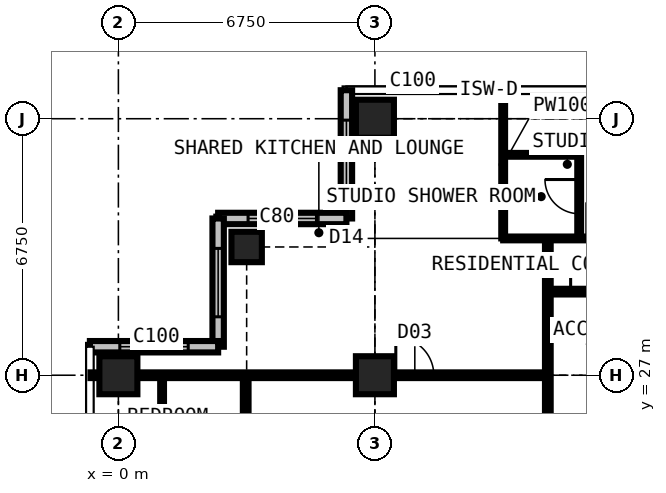
"""IFC4 building model, lengths in metres.
Left out: names, types, materials, properties, quantities, classifications, styles, units other than length and angle.
Written with IfcOpenShell. Run it as: python <this file> out.ifc"""

import sys

from ifc_helpers import new_model, si_unit, direction, frame, frame_2d, origin, origin_2d, place, context, subcontext, project, spatial, rectangle, extrude, element, fill, save


model = new_model("IFC4")
c1 = context("Model", 3, precision=1e-05, world=origin(), true_north=direction((0.0, 1.0)))
c2 = subcontext(c1, "Body", "Model", "MODEL_VIEW")
j1 = project(units=[si_unit("LENGTHUNIT", "METRE"), si_unit("PLANEANGLEUNIT", "RADIAN")], contexts=[c1])
p1 = place(None, origin())
s1 = spatial("IfcSite", under=j1, at=p1, CompositionType="ELEMENT")
p2 = place(p1, origin())
s2 = spatial("IfcBuilding", under=s1, at=p2, CompositionType="ELEMENT")
p3 = place(p2, frame((0.0, 0.0, 240.3)))
s3 = spatial("IfcBuildingStorey", under=s2, at=p3, CompositionType="ELEMENT", Elevation=240.3)
p4 = place(p3, frame((0.0, 27.0, 0.0), z_axis=(0.0, 0.0, 1.0), x_axis=(1.0, 0.0, 0.0)))
e1 = element("IfcColumn", 1, at=p4, inside=s3, PredefinedType="COLUMN", context=c2, shape_type="SweptSolid", body=[
    extrude(rectangle(XDim=1.0, YDim=1.0, at=origin_2d()), origin(), (0.0, 0.0, 1.0), 3.6),
])
p5 = place(p3, frame((3.375, 30.375, 0.0), z_axis=(0.0, 0.0, 1.0), x_axis=(1.0, 0.0, 0.0)))
e2 = element("IfcColumn", 2, at=p5, inside=s3, PredefinedType="COLUMN", context=c2, shape_type="SweptSolid", body=[
    extrude(rectangle(XDim=0.8, YDim=0.8, at=origin_2d()), origin(), (0.0, 0.0, 1.0), 3.6),
])
for number, where, z_axis, x_axis in (
    (3, (6.75, 27.0, 0.0), (0.0, 0.0, 1.0), (1.0, 0.0, 0.0)),
    (4, (6.75, 33.75, 0.0), (0.0, 0.0, 1.0), (1.0, 0.0, 0.0)),
):
    element("IfcColumn", number, at=place(p3, frame(where, z_axis=z_axis, x_axis=x_axis)), inside=s3, PredefinedType="COLUMN", context=c2, shape_type="SweptSolid", body=[
        extrude(rectangle(XDim=1.0, YDim=1.0, at=origin_2d()), origin(), (0.0, 0.0, 1.0), 3.6),
    ])
p6 = place(p3, frame((6.0, 34.5, 0.0), z_axis=(0.0, 0.0, 1.0), x_axis=(0.0, -1.0, 0.0)))
e5 = element("IfcWall", 5, at=p6, inside=s3, PredefinedType="SOLIDWALL", context=c2, shape_type="SweptSolid", body=[
    extrude(rectangle(XDim=3.375, YDim=0.3, at=frame_2d((1.688, 0.0))), origin(), (0.0, 0.0, 1.0), 3.375),
])
p7 = place(p6, frame((0.788, 0.0, 0.6)))
e6 = element("IfcOpeningElement", 6, at=p7, cuts=e5, PredefinedType="OPENING", context=c2, shape_type="SweptSolid", body=[
    extrude(rectangle(XDim=1.8, YDim=2.1, at=frame_2d((0.9, 1.05))), frame((0.0, 0.16, 0.0), z_axis=(0.0, -1.0, 0.0), x_axis=(1.0, 0.0, 0.0)), (0.0, 0.0, 1.0), 0.32),
])
p8 = place(p3, frame((6.0, 31.125, 0.0), z_axis=(0.0, 0.0, 1.0), x_axis=(-1.0, 0.0, 0.0)))
e7 = element("IfcWall", 7, at=p8, inside=s3, PredefinedType="SOLIDWALL", context=c2, shape_type="SweptSolid", body=[
    extrude(rectangle(XDim=3.375, YDim=0.3, at=frame_2d((1.688, 0.0))), origin(), (0.0, 0.0, 1.0), 3.375),
])
p9 = place(p8, frame((0.788, 0.0, 0.6)))
e8 = element("IfcOpeningElement", 8, at=p9, cuts=e7, PredefinedType="OPENING", context=c2, shape_type="SweptSolid", body=[
    extrude(rectangle(XDim=1.8, YDim=2.1, at=frame_2d((0.9, 1.05))), frame((0.0, 0.16, 0.0), z_axis=(0.0, -1.0, 0.0), x_axis=(1.0, 0.0, 0.0)), (0.0, 0.0, 1.0), 0.32),
])
p10 = place(p3, frame((2.625, 31.125, 0.0), z_axis=(0.0, 0.0, 1.0), x_axis=(0.0, -1.0, 0.0)))
e9 = element("IfcWall", 9, at=p10, inside=s3, PredefinedType="SOLIDWALL", context=c2, shape_type="SweptSolid", body=[
    extrude(rectangle(XDim=3.375, YDim=0.3, at=frame_2d((1.688, 0.0))), origin(), (0.0, 0.0, 1.0), 3.375),
])
p11 = place(p10, frame((0.788, 0.0, 0.6)))
e10 = element("IfcOpeningElement", 10, at=p11, cuts=e9, PredefinedType="OPENING", context=c2, shape_type="SweptSolid", body=[
    extrude(rectangle(XDim=1.8, YDim=2.1, at=frame_2d((0.9, 1.05))), frame((0.0, 0.16, 0.0), z_axis=(0.0, -1.0, 0.0), x_axis=(1.0, 0.0, 0.0)), (0.0, 0.0, 1.0), 0.32),
])
p12 = place(p3, frame((2.625, 27.75, 0.0), z_axis=(0.0, 0.0, 1.0), x_axis=(-1.0, 0.0, 0.0)))
e11 = element("IfcWall", 11, at=p12, inside=s3, PredefinedType="SOLIDWALL", context=c2, shape_type="SweptSolid", body=[
    extrude(rectangle(XDim=3.375, YDim=0.3, at=frame_2d((1.688, 0.0))), origin(), (0.0, 0.0, 1.0), 3.375),
])
p13 = place(p12, frame((0.788, 0.0, 0.6)))
e12 = element("IfcOpeningElement", 12, at=p13, cuts=e11, PredefinedType="OPENING", context=c2, shape_type="SweptSolid", body=[
    extrude(rectangle(XDim=1.8, YDim=2.1, at=frame_2d((0.9, 1.05))), frame((0.0, 0.16, 0.0), z_axis=(0.0, -1.0, 0.0), x_axis=(1.0, 0.0, 0.0)), (0.0, 0.0, 1.0), 0.32),
])
p14 = place(p3, frame((-0.734, 27.0, 0.0), z_axis=(0.0, 0.0, 1.0), x_axis=(1.0, 0.0, 0.0)))
e13 = element("IfcWall", 13, at=p14, inside=s3, PredefinedType="PARTITIONING", context=c2, shape_type="SweptSolid", body=[
    extrude(rectangle(XDim=12.034, YDim=0.15, at=frame_2d((6.017, 0.0))), origin(), (0.0, 0.0, 1.0), 2.877),
])
p15 = place(p14, frame((8.034, 0.0, 0.0)))
e14 = element("IfcOpeningElement", 14, at=p15, cuts=e13, PredefinedType="OPENING", context=c2, shape_type="SweptSolid", body=[
    extrude(rectangle(XDim=1.0, YDim=2.2, at=frame_2d((0.5, 1.1))), frame((0.0, 0.085, 0.0), z_axis=(0.0, -1.0, 0.0), x_axis=(1.0, 0.0, 0.0)), (0.0, 0.0, 1.0), 0.17),
])
p16 = place(p3, frame((1.15, 25.0, 0.0), z_axis=(0.0, 0.0, 1.0), x_axis=(0.0, 1.0, 0.0)))
e15 = element("IfcWall", 15, at=p16, inside=s3, PredefinedType="PARTITIONING", context=c2, shape_type="SweptSolid", body=[
    extrude(rectangle(XDim=2.0, YDim=0.1, at=frame_2d((1.0, 0.0))), origin(), (0.0, 0.0, 1.0), 3.375),
])
p17 = place(p3, frame((3.35, 13.5, 0.0), z_axis=(0.0, 0.0, 1.0), x_axis=(0.0, 1.0, 0.0)))
e16 = element("IfcWall", 16, at=p17, inside=s3, PredefinedType="PARTITIONING", context=c2, shape_type="SweptSolid", body=[
    extrude(rectangle(XDim=13.5, YDim=0.15, at=frame_2d((6.75, 0.0))), origin(), (0.0, 0.0, 1.0), 3.375),
])
p18 = place(p17, frame((10.325, 0.0, 0.0)))
e17 = element("IfcOpeningElement", 17, at=p18, cuts=e16, PredefinedType="OPENING", context=c2, shape_type="SweptSolid", body=[
    extrude(rectangle(XDim=0.95, YDim=2.2, at=frame_2d((0.475, 1.1))), frame((0.0, 0.085, 0.0), z_axis=(0.0, -1.0, 0.0), x_axis=(1.0, 0.0, 0.0)), (0.0, 0.0, 1.0), 0.17),
])
p19 = place(p17, frame((0.25, 0.0, 0.0)))
e18 = element("IfcOpeningElement", 18, at=p19, cuts=e16, PredefinedType="OPENING", context=c2, shape_type="SweptSolid", body=[
    extrude(rectangle(XDim=0.95, YDim=2.2, at=frame_2d((0.475, 1.1))), frame((0.0, 0.085, 0.0), z_axis=(0.0, -1.0, 0.0), x_axis=(1.0, 0.0, 0.0)), (0.0, 0.0, 1.0), 0.17),
])
p20 = place(p17, frame((3.575, 0.0, 0.0)))
e19 = element("IfcOpeningElement", 19, at=p20, cuts=e16, PredefinedType="OPENING", context=c2, shape_type="SweptSolid", body=[
    extrude(rectangle(XDim=0.95, YDim=2.2, at=frame_2d((0.475, 1.1))), frame((0.0, 0.085, 0.0), z_axis=(0.0, -1.0, 0.0), x_axis=(1.0, 0.0, 0.0)), (0.0, 0.0, 1.0), 0.17),
])
p21 = place(p17, frame((6.95, 0.0, 0.0)))
e20 = element("IfcOpeningElement", 20, at=p21, cuts=e16, PredefinedType="OPENING", context=c2, shape_type="SweptSolid", body=[
    extrude(rectangle(XDim=0.95, YDim=2.2, at=frame_2d((0.475, 1.1))), frame((0.0, 0.085, 0.0), z_axis=(0.0, -1.0, 0.0), x_axis=(1.0, 0.0, 0.0)), (0.0, 0.0, 1.0), 0.17),
])
p22 = place(p3, frame((10.125, 30.6, 0.0), z_axis=(0.0, 0.0, 1.0), x_axis=(0.0, 1.0, 0.0)))
e21 = element("IfcWall", 21, at=p22, inside=s3, PredefinedType="PARTITIONING", context=c2, shape_type="SweptSolid", body=[
    extrude(rectangle(XDim=3.884, YDim=0.1, at=frame_2d((1.942, 0.0))), origin(), (0.0, 0.0, 1.0), 3.375),
])
p23 = place(p3, frame((10.125, 30.6, 0.0), z_axis=(0.0, 0.0, 1.0), x_axis=(1.0, 0.0, 0.0)))
e22 = element("IfcWall", 22, at=p23, inside=s3, PredefinedType="PARTITIONING", context=c2, shape_type="SweptSolid", body=[
    extrude(rectangle(XDim=3.375, YDim=0.1, at=frame_2d((1.688, 0.0))), origin(), (0.0, 0.0, 1.0), 3.375),
])
p24 = place(p23, frame((2.2, 0.0, 0.0)))
e23 = element("IfcOpeningElement", 23, at=p24, cuts=e22, PredefinedType="OPENING", context=c2, shape_type="SweptSolid", body=[
    extrude(rectangle(XDim=0.95, YDim=2.2, at=frame_2d((0.475, 1.1))), frame((0.0, 0.06, 0.0), z_axis=(0.0, -1.0, 0.0), x_axis=(1.0, 0.0, 0.0)), (0.0, 0.0, 1.0), 0.12),
])
p25 = place(p3, frame((10.125, 32.8, 0.0), z_axis=(0.0, 0.0, 1.0), x_axis=(1.0, 0.0, 0.0)))
e24 = element("IfcWall", 24, at=p25, inside=s3, PredefinedType="PARTITIONING", context=c2, shape_type="SweptSolid", body=[
    extrude(rectangle(XDim=2.0, YDim=0.1, at=frame_2d((1.0, 0.0))), origin(), (0.0, 0.0, 1.0), 3.375),
])
p26 = place(p3, frame((11.3, 11.3, 0.0), z_axis=(0.0, 0.0, 1.0), x_axis=(0.0, 1.0, 0.0)))
e25 = element("IfcWall", 25, at=p26, inside=s3, PredefinedType="PARTITIONING", context=c2, shape_type="SweptSolid", body=[
    extrude(rectangle(XDim=19.3, YDim=0.15, at=frame_2d((9.65, 0.0))), origin(), (0.0, 0.0, 1.0), 3.375),
])
p27 = place(p26, frame((13.525, 0.0, 0.0)))
e26 = element("IfcOpeningElement", 26, at=p27, cuts=e25, PredefinedType="OPENING", context=c2, shape_type="SweptSolid", body=[
    extrude(rectangle(XDim=1.0, YDim=2.2, at=frame_2d((0.5, 1.1))), frame((0.0, 0.085, 0.0), z_axis=(0.0, -1.0, 0.0), x_axis=(1.0, 0.0, 0.0)), (0.0, 0.0, 1.0), 0.17),
])
p28 = place(p26, frame((10.438, 0.0, 0.0)))
e27 = element("IfcOpeningElement", 27, at=p28, cuts=e25, PredefinedType="OPENING", context=c2, shape_type="SweptSolid", body=[
    extrude(rectangle(XDim=1.0, YDim=2.2, at=frame_2d((0.5, 1.1))), frame((0.0, 0.085, 0.0), z_axis=(0.0, -1.0, 0.0), x_axis=(1.0, 0.0, 0.0)), (0.0, 0.0, 1.0), 0.17),
])
p29 = place(p3, frame((11.3, 29.2, 0.0), z_axis=(0.0, 0.0, 1.0), x_axis=(1.0, 0.0, 0.0)))
e28 = element("IfcWall", 28, at=p29, inside=s3, PredefinedType="PARTITIONING", context=c2, shape_type="SweptSolid", body=[
    extrude(rectangle(XDim=19.809, YDim=0.15, at=frame_2d((9.904, 0.0))), origin(), (0.0, 0.0, 1.0), 3.375),
])
p30 = place(p29, frame((14.625, 0.0, 0.0)))
e29 = element("IfcOpeningElement", 29, at=p30, cuts=e28, PredefinedType="OPENING", context=c2, shape_type="SweptSolid", body=[
    extrude(rectangle(XDim=1.0, YDim=2.2, at=frame_2d((0.5, 1.1))), frame((0.0, 0.085, 0.0), z_axis=(0.0, -1.0, 0.0), x_axis=(1.0, 0.0, 0.0)), (0.0, 0.0, 1.0), 0.17),
])
p31 = place(p29, frame((6.4, 0.0, 0.0)))
e30 = element("IfcOpeningElement", 30, at=p31, cuts=e28, PredefinedType="OPENING", context=c2, shape_type="SweptSolid", body=[
    extrude(rectangle(XDim=0.95, YDim=2.2, at=frame_2d((0.475, 1.1))), frame((0.0, 0.085, 0.0), z_axis=(0.0, -1.0, 0.0), x_axis=(1.0, 0.0, 0.0)), (0.0, 0.0, 1.0), 0.17),
])
p32 = place(p29, frame((9.2, 0.0, 0.0)))
e31 = element("IfcOpeningElement", 31, at=p32, cuts=e28, PredefinedType="OPENING", context=c2, shape_type="SweptSolid", body=[
    extrude(rectangle(XDim=0.95, YDim=2.2, at=frame_2d((0.475, 1.1))), frame((0.0, 0.085, 0.0), z_axis=(0.0, -1.0, 0.0), x_axis=(1.0, 0.0, 0.0)), (0.0, 0.0, 1.0), 0.17),
])
p33 = place(p29, frame((0.6, 0.0, 0.0)))
e32 = element("IfcOpeningElement", 32, at=p33, cuts=e28, PredefinedType="OPENING", context=c2, shape_type="SweptSolid", body=[
    extrude(rectangle(XDim=1.0, YDim=2.2, at=frame_2d((0.5, 1.1))), frame((0.0, 0.085, 0.0), z_axis=(0.0, -1.0, 0.0), x_axis=(1.0, 0.0, 0.0)), (0.0, 0.0, 1.0), 0.17),
])
p34 = place(p3, frame((12.125, 30.6, 0.0), z_axis=(0.0, 0.0, 1.0), x_axis=(0.0, 1.0, 0.0)))
e33 = element("IfcWall", 33, at=p34, inside=s3, PredefinedType="PARTITIONING", context=c2, shape_type="SweptSolid", body=[
    extrude(rectangle(XDim=2.2, YDim=0.1, at=frame_2d((1.1, 0.0))), origin(), (0.0, 0.0, 1.0), 3.375),
])
p35 = place(p34, frame((0.65, 0.0, 0.0)))
e34 = element("IfcOpeningElement", 34, at=p35, cuts=e33, PredefinedType="OPENING", context=c2, shape_type="SweptSolid", body=[
    extrude(rectangle(XDim=0.9, YDim=2.2, at=frame_2d((0.45, 1.1))), frame((0.0, 0.06, 0.0), z_axis=(0.0, -1.0, 0.0), x_axis=(1.0, 0.0, 0.0)), (0.0, 0.0, 1.0), 0.12),
])
p36 = place(p7, origin())
e35 = element("IfcWindow", 35, at=p36, inside=s3, PartitioningType="SINGLE_PANEL", PredefinedType="WINDOW", context=c2, shape_type="SweptSolid", body=[
    extrude(rectangle(XDim=1.8, YDim=2.1, at=frame_2d((0.9, 1.05))), frame((0.0, 0.03, 0.0), z_axis=(0.0, -1.0, 0.0), x_axis=(1.0, 0.0, 0.0)), (0.0, 0.0, 1.0), 0.06),
])
fill(e6, e35)
p37 = place(p9, origin())
e36 = element("IfcWindow", 36, at=p37, inside=s3, PartitioningType="SINGLE_PANEL", PredefinedType="WINDOW", context=c2, shape_type="SweptSolid", body=[
    extrude(rectangle(XDim=1.8, YDim=2.1, at=frame_2d((0.9, 1.05))), frame((0.0, 0.03, 0.0), z_axis=(0.0, -1.0, 0.0), x_axis=(1.0, 0.0, 0.0)), (0.0, 0.0, 1.0), 0.06),
])
fill(e8, e36)
p38 = place(p11, origin())
e37 = element("IfcWindow", 37, at=p38, inside=s3, PartitioningType="SINGLE_PANEL", PredefinedType="WINDOW", context=c2, shape_type="SweptSolid", body=[
    extrude(rectangle(XDim=1.8, YDim=2.1, at=frame_2d((0.9, 1.05))), frame((0.0, 0.03, 0.0), z_axis=(0.0, -1.0, 0.0), x_axis=(1.0, 0.0, 0.0)), (0.0, 0.0, 1.0), 0.06),
])
fill(e10, e37)
p39 = place(p13, origin())
e38 = element("IfcWindow", 38, at=p39, inside=s3, PartitioningType="SINGLE_PANEL", PredefinedType="WINDOW", context=c2, shape_type="SweptSolid", body=[
    extrude(rectangle(XDim=1.8, YDim=2.1, at=frame_2d((0.9, 1.05))), frame((0.0, 0.03, 0.0), z_axis=(0.0, -1.0, 0.0), x_axis=(1.0, 0.0, 0.0)), (0.0, 0.0, 1.0), 0.06),
])
fill(e12, e38)
p40 = place(p35, origin())
e39 = element("IfcDoor", 39, at=p40, inside=s3, OperationType="SINGLE_SWING_RIGHT", PredefinedType="DOOR", context=c2, shape_type="SweptSolid", body=[
    extrude(rectangle(XDim=0.9, YDim=2.2, at=frame_2d((0.45, 1.1))), frame((0.0, 0.025, 0.0), z_axis=(0.0, -1.0, 0.0), x_axis=(1.0, 0.0, 0.0)), (0.0, 0.0, 1.0), 0.05),
])
fill(e34, e39)
p41 = place(p33, origin())
e40 = element("IfcDoor", 40, at=p41, inside=s3, OperationType="SINGLE_SWING_LEFT", PredefinedType="DOOR", context=c2, shape_type="SweptSolid", body=[
    extrude(rectangle(XDim=1.0, YDim=2.2, at=frame_2d((0.5, 1.1))), frame((0.0, 0.025, 0.0), z_axis=(0.0, -1.0, 0.0), x_axis=(1.0, 0.0, 0.0)), (0.0, 0.0, 1.0), 0.05),
])
fill(e32, e40)
p42 = place(p15, origin())
e41 = element("IfcDoor", 41, at=p42, inside=s3, OperationType="SINGLE_SWING_LEFT", PredefinedType="DOOR", context=c2, shape_type="SweptSolid", body=[
    extrude(rectangle(XDim=1.0, YDim=2.2, at=frame_2d((0.5, 1.1))), frame((0.0, 0.025, 0.0), z_axis=(0.0, -1.0, 0.0), x_axis=(1.0, 0.0, 0.0)), (0.0, 0.0, 1.0), 0.05),
])
fill(e14, e41)
save(model, sys.argv[1])
